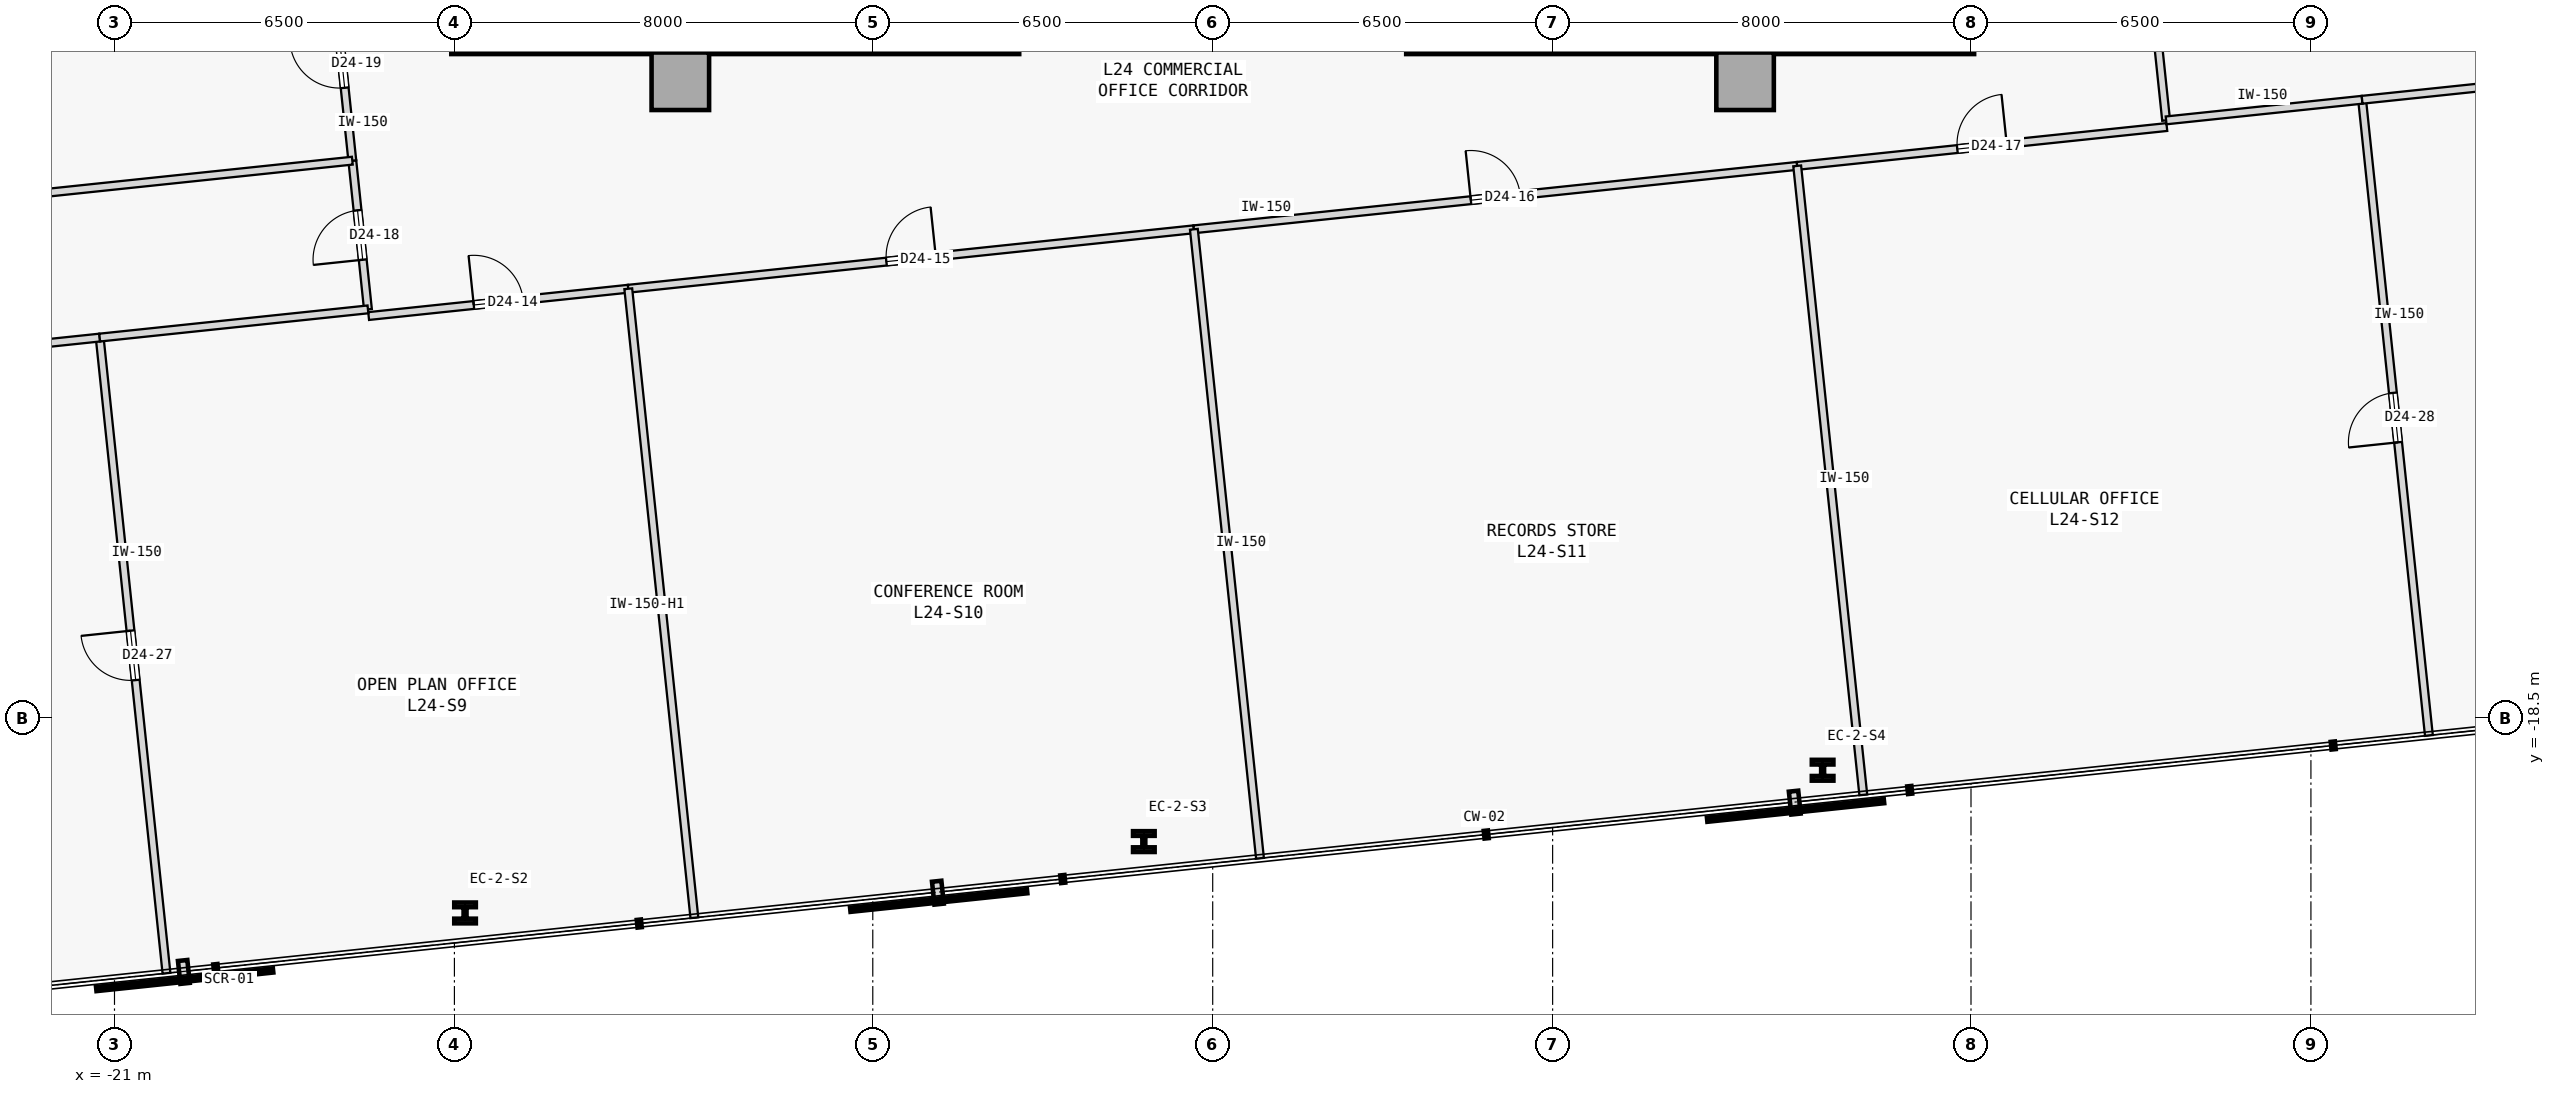
"""IFC4 building model, lengths in metres.
Left out: names, types, materials, properties, quantities, classifications, styles, units other than length and angle.
Written with IfcOpenShell. Run it as: python <this file> out.ifc"""

import sys

from ifc_helpers import new_model, si_unit, direction, frame, frame_2d, origin, origin_2d, place, context, subcontext, project, spatial, rectangle, i_section, extrude, element, fill, save


model = new_model("IFC4")
c1 = context("Model", 3, precision=1e-05, world=origin(), true_north=direction((0.0, 1.0)))
c2 = subcontext(c1, "Body", "Model", "MODEL_VIEW")
j1 = project(units=[si_unit("LENGTHUNIT", "METRE"), si_unit("PLANEANGLEUNIT", "RADIAN")], contexts=[c1])
p1 = place(None, origin())
s1 = spatial("IfcSite", under=j1, at=p1, CompositionType="ELEMENT")
p2 = place(p1, origin())
s2 = spatial("IfcBuilding", under=s1, at=p2, CompositionType="ELEMENT")
p3 = place(p2, frame((0.0, 0.0, 98.5)))
s3 = spatial("IfcBuildingStorey", under=s2, at=p3, CompositionType="ELEMENT", Elevation=98.5)
for number, where, z_axis, x_axis in (
    (1, (-10.18, -6.32, 0.0), (0.0, 0.0, 1.0), (1.0, 0.0, 0.0)),
    (2, (10.18, -6.32, 0.0), (0.0, 0.0, 1.0), (1.0, 0.0, 0.0)),
):
    element("IfcColumn", number, at=place(p3, frame(where, z_axis=z_axis, x_axis=x_axis)), inside=s3, PredefinedType="COLUMN", context=c2, shape_type="SweptSolid", body=[
        extrude(rectangle(XDim=1.1, YDim=1.1, at=origin_2d()), origin(), (0.0, 0.0, 1.0), 3.7),
    ])
for number, where, z_axis, x_axis in (
    (3, (-14.56, -5.6, 0.0), (0.0, 0.0, 1.0), (1.0, 0.0, 0.0)),
    (4, (3.7, -5.6, 0.0), (0.0, 0.0, 1.0), (1.0, 0.0, 0.0)),
):
    element("IfcWall", number, at=place(p3, frame(where, z_axis=z_axis, x_axis=x_axis)), inside=s3, PredefinedType="SHEAR", context=c2, shape_type="SweptSolid", body=[
        extrude(rectangle(XDim=10.86, YDim=0.4, at=frame_2d((5.43, 0.0))), origin(), (0.0, 0.0, 1.0), 3.475),
    ])
for number, where, z_axis, x_axis in (
    (5, (-14.297, -22.222, 0.0), (0.0, 0.0, 1.0), (1.0, 0.0, 0.0)),
    (6, (-1.317, -20.858, 0.0), (0.0, 0.0, 1.0), (1.0, 0.0, 0.0)),
    (7, (11.663, -19.494, 0.0), (0.0, 0.0, 1.0), (1.0, 0.0, 0.0)),
):
    element("IfcColumn", number, at=place(p3, frame(where, z_axis=z_axis, x_axis=x_axis)), inside=s3, PredefinedType="COLUMN", context=c2, shape_type="SweptSolid", body=[
        extrude(i_section(OverallWidth=0.413, OverallDepth=0.398, WebThickness=0.056, FlangeThickness=0.089, FilletRadius=0.015, at=origin_2d()), origin(), (0.0, 0.0, 1.0), 3.7),
    ])
p4 = place(p3, frame((-16.14, -10.809, 0.0), z_axis=(0.0, 0.0, 1.0), x_axis=(0.994523393184, 0.104514211519, 0.0)))
e8 = element("IfcWall", 8, at=p4, inside=s3, PredefinedType="PARTITIONING", context=c2, shape_type="SweptSolid", body=[
    extrude(rectangle(XDim=4.992, YDim=0.15, at=frame_2d((2.496, 0.0))), origin(), (0.0, 0.0, 1.0), 3.475),
])
p5 = place(p4, frame((2.021, 0.0, 0.0)))
e9 = element("IfcOpeningElement", 9, at=p5, cuts=e8, PredefinedType="OPENING", context=c2, shape_type="SweptSolid", body=[
    extrude(rectangle(XDim=0.95, YDim=2.15, at=frame_2d((0.475, 1.075))), frame((0.0, 0.085, 0.0), z_axis=(0.0, -1.0, 0.0), x_axis=(1.0, 0.0, 0.0)), (0.0, 0.0, 1.0), 0.17),
])
p6 = place(p3, frame((-11.175, -10.287, 0.0), z_axis=(0.0, 0.0, 1.0), x_axis=(0.994522169869, 0.104525851533, 0.0)))
e10 = element("IfcWall", 10, at=p6, inside=s3, PredefinedType="PARTITIONING", context=c2, shape_type="SweptSolid", body=[
    extrude(rectangle(XDim=10.875, YDim=0.15, at=frame_2d((5.438, 0.0))), origin(), (0.0, 0.0, 1.0), 3.475),
])
p7 = place(p6, frame((4.962, 0.0, 0.0)))
e11 = element("IfcOpeningElement", 11, at=p7, cuts=e10, PredefinedType="OPENING", context=c2, shape_type="SweptSolid", body=[
    extrude(rectangle(XDim=0.95, YDim=2.15, at=frame_2d((0.475, 1.075))), frame((0.0, 0.085, 0.0), z_axis=(0.0, -1.0, 0.0), x_axis=(1.0, 0.0, 0.0)), (0.0, 0.0, 1.0), 0.17),
])
p8 = place(p3, frame((-0.36, -9.151, 0.0), z_axis=(0.0, 0.0, 1.0), x_axis=(0.994520780406, 0.10453907088, 0.0)))
e12 = element("IfcWall", 12, at=p8, inside=s3, PredefinedType="PARTITIONING", context=c2, shape_type="SweptSolid", body=[
    extrude(rectangle(XDim=11.6, YDim=0.15, at=frame_2d((5.8, 0.0))), origin(), (0.0, 0.0, 1.0), 3.475),
])
p9 = place(p8, frame((5.325, 0.0, 0.0)))
e13 = element("IfcOpeningElement", 13, at=p9, cuts=e12, PredefinedType="OPENING", context=c2, shape_type="SweptSolid", body=[
    extrude(rectangle(XDim=0.95, YDim=2.15, at=frame_2d((0.475, 1.075))), frame((0.0, 0.085, 0.0), z_axis=(0.0, -1.0, 0.0), x_axis=(1.0, 0.0, 0.0)), (0.0, 0.0, 1.0), 0.17),
])
p10 = place(p3, frame((11.177, -7.938, 0.0), z_axis=(0.0, 0.0, 1.0), x_axis=(0.994525011473, 0.104498811264, 0.0)))
e14 = element("IfcWall", 14, at=p10, inside=s3, PredefinedType="PARTITIONING", context=c2, shape_type="SweptSolid", body=[
    extrude(rectangle(XDim=7.107, YDim=0.15, at=frame_2d((3.553, 0.0))), origin(), (0.0, 0.0, 1.0), 3.475),
])
p11 = place(p10, frame((3.079, 0.0, 0.0)))
e15 = element("IfcOpeningElement", 15, at=p11, cuts=e14, PredefinedType="OPENING", context=c2, shape_type="SweptSolid", body=[
    extrude(rectangle(XDim=0.95, YDim=2.15, at=frame_2d((0.475, 1.075))), frame((0.0, 0.085, 0.0), z_axis=(0.0, -1.0, 0.0), x_axis=(1.0, 0.0, 0.0)), (0.0, 0.0, 1.0), 0.17),
])
p12 = place(p3, frame((-16.153, -10.682, 0.0), z_axis=(0.0, 0.0, 1.0), x_axis=(-0.104600331874, 0.994514339048, 0.0)))
e16 = element("IfcWall", 16, at=p12, inside=s3, PredefinedType="PARTITIONING", context=c2, shape_type="SweptSolid", body=[
    extrude(rectangle(XDim=2.859, YDim=0.15, at=frame_2d((1.43, 0.0))), origin(), (0.0, 0.0, 1.0), 3.475),
])
p13 = place(p12, frame((0.955, 0.0, 0.0)))
e17 = element("IfcOpeningElement", 17, at=p13, cuts=e16, PredefinedType="OPENING", context=c2, shape_type="SweptSolid", body=[
    extrude(rectangle(XDim=0.95, YDim=2.15, at=frame_2d((0.475, 1.075))), frame((0.0, 0.085, 0.0), z_axis=(0.0, -1.0, 0.0), x_axis=(1.0, 0.0, 0.0)), (0.0, 0.0, 1.0), 0.17),
])
p14 = place(p3, frame((-16.452, -7.838, 0.0), z_axis=(0.0, 0.0, 1.0), x_axis=(-0.104481590513, 0.994526820777, 0.0)))
e18 = element("IfcWall", 18, at=p14, inside=s3, PredefinedType="PARTITIONING", context=c2, shape_type="SweptSolid", body=[
    extrude(rectangle(XDim=3.753, YDim=0.15, at=frame_2d((1.876, 0.0))), origin(), (0.0, 0.0, 1.0), 3.475),
])
p15 = place(p14, frame((1.402, 0.0, 0.0)))
e19 = element("IfcOpeningElement", 19, at=p15, cuts=e18, PredefinedType="OPENING", context=c2, shape_type="SweptSolid", body=[
    extrude(rectangle(XDim=0.95, YDim=2.15, at=frame_2d((0.475, 1.075))), frame((0.0, 0.085, 0.0), z_axis=(0.0, -1.0, 0.0), x_axis=(1.0, 0.0, 0.0)), (0.0, 0.0, 1.0), 0.17),
])
p16 = place(p3, frame((18.231, -7.068, 0.0), z_axis=(0.0, 0.0, 1.0), x_axis=(-0.104527419485, 0.994522005074, 0.0)))
e20 = element("IfcWall", 20, at=p16, inside=s3, PredefinedType="PARTITIONING", context=c2, shape_type="SweptSolid", body=[
    extrude(rectangle(XDim=8.399, YDim=0.15, at=frame_2d((4.199, 0.0))), origin(), (0.0, 0.0, 1.0), 3.475),
])
p17 = place(p16, frame((3.725, 0.0, 0.0)))
e21 = element("IfcOpeningElement", 21, at=p17, cuts=e20, PredefinedType="OPENING", context=c2, shape_type="SweptSolid", body=[
    extrude(rectangle(XDim=0.95, YDim=2.15, at=frame_2d((0.475, 1.075))), frame((0.0, 0.085, 0.0), z_axis=(0.0, -1.0, 0.0), x_axis=(1.0, 0.0, 0.0)), (0.0, 0.0, 1.0), 0.17),
])
p18 = place(p3, frame((-20.006, -23.375, 0.0), z_axis=(0.0, 0.0, 1.0), x_axis=(-0.104540236679, 0.994520657862, 0.0)))
e22 = element("IfcWall", 22, at=p18, inside=s3, PredefinedType="PARTITIONING", context=c2, shape_type="SweptSolid", body=[
    extrude(rectangle(XDim=12.221, YDim=0.15, at=frame_2d((6.11, 0.0))), origin(), (0.0, 0.0, 1.0), 3.475),
])
p19 = place(p18, frame((5.635, 0.0, 0.0)))
e23 = element("IfcOpeningElement", 23, at=p19, cuts=e22, PredefinedType="OPENING", context=c2, shape_type="SweptSolid", body=[
    extrude(rectangle(XDim=0.95, YDim=2.15, at=frame_2d((0.475, 1.075))), frame((0.0, 0.085, 0.0), z_axis=(0.0, -1.0, 0.0), x_axis=(1.0, 0.0, 0.0)), (0.0, 0.0, 1.0), 0.17),
])
p20 = place(p3, frame((-32.099, -12.358, 0.0), z_axis=(0.0, 0.0, 1.0), x_axis=(0.994522169869, 0.104525851533, 0.0)))
e24 = element("IfcWall", 24, at=p20, inside=s3, PredefinedType="PARTITIONING", context=c2, shape_type="SweptSolid", body=[
    extrude(rectangle(XDim=10.875, YDim=0.15, at=frame_2d((5.438, 0.0))), origin(), (0.0, 0.0, 1.0), 3.475),
])
p21 = place(p3, frame((-9.911, -22.314, 0.0), z_axis=(0.0, 0.0, 1.0), x_axis=(-0.104515587229, 0.99452324861, 0.0)))
e25 = element("IfcWall", 25, at=p21, inside=s3, PredefinedType="PARTITIONING", context=c2, shape_type="SweptSolid", body=[
    extrude(rectangle(XDim=12.093, YDim=0.15, at=frame_2d((6.046, 0.0))), origin(), (0.0, 0.0, 1.0), 3.025),
])
p22 = place(p3, frame((-21.283, -11.221, 0.0), z_axis=(0.0, 0.0, 1.0), x_axis=(0.994524110249, 0.104507387942, 0.0)))
e26 = element("IfcWall", 26, at=p22, inside=s3, PredefinedType="PARTITIONING", context=c2, shape_type="SweptSolid", body=[
    extrude(rectangle(XDim=5.158, YDim=0.15, at=frame_2d((2.579, 0.0))), origin(), (0.0, 0.0, 1.0), 3.475),
])
p23 = place(p3, frame((0.904, -21.177, 0.0), z_axis=(0.0, 0.0, 1.0), x_axis=(-0.104517685722, 0.994523028075, 0.0)))
e27 = element("IfcWall", 27, at=p23, inside=s3, PredefinedType="PARTITIONING", context=c2, shape_type="SweptSolid", body=[
    extrude(rectangle(XDim=12.093, YDim=0.15, at=frame_2d((6.046, 0.0))), origin(), (0.0, 0.0, 1.0), 3.475),
])
p24 = place(p3, frame((12.441, -19.965, 0.0), z_axis=(0.0, 0.0, 1.0), x_axis=(-0.104535555083, 0.994521149963, 0.0)))
e28 = element("IfcWall", 28, at=p24, inside=s3, PredefinedType="PARTITIONING", context=c2, shape_type="SweptSolid", body=[
    extrude(rectangle(XDim=12.093, YDim=0.15, at=frame_2d((6.046, 0.0))), origin(), (0.0, 0.0, 1.0), 3.475),
])
p25 = place(p3, frame((23.256, -18.828, 0.0), z_axis=(0.0, 0.0, 1.0), x_axis=(-0.104540236679, 0.994520657862, 0.0)))
e29 = element("IfcWall", 29, at=p25, inside=s3, PredefinedType="PARTITIONING", context=c2, shape_type="SweptSolid", body=[
    extrude(rectangle(XDim=12.221, YDim=0.15, at=frame_2d((6.11, 0.0))), origin(), (0.0, 0.0, 1.0), 3.475),
])
p26 = place(p25, frame((5.635, 0.0, 0.0)))
e30 = element("IfcOpeningElement", 30, at=p26, cuts=e29, PredefinedType="OPENING", context=c2, shape_type="SweptSolid", body=[
    extrude(rectangle(XDim=0.95, YDim=2.15, at=frame_2d((0.475, 1.075))), frame((0.0, 0.085, 0.0), z_axis=(0.0, -1.0, 0.0), x_axis=(1.0, 0.0, 0.0)), (0.0, 0.0, 1.0), 0.17),
])
p27 = place(p3, frame((18.231, -7.068, 0.0), z_axis=(0.0, 0.0, 1.0), x_axis=(0.99452354487, 0.10451276812, 0.0)))
e31 = element("IfcWall", 31, at=p27, inside=s3, PredefinedType="PARTITIONING", context=c2, shape_type="SweptSolid", body=[
    extrude(rectangle(XDim=3.768, YDim=0.15, at=frame_2d((1.884, 0.0))), origin(), (0.0, 0.0, 1.0), 3.475),
])
p28 = place(p3, frame((21.979, -6.674, 0.0), z_axis=(0.0, 0.0, 1.0), x_axis=(0.994519921083, 0.10454724563, 0.0)))
e32 = element("IfcWall", 32, at=p28, inside=s3, PredefinedType="PARTITIONING", context=c2, shape_type="SweptSolid", body=[
    extrude(rectangle(XDim=9.425, YDim=0.15, at=frame_2d((4.712, 0.0))), origin(), (0.0, 0.0, 1.0), 3.475),
])
p29 = place(p3, frame((-32.397, -9.514, 0.0), z_axis=(0.0, 0.0, 1.0), x_axis=(0.994521044813, 0.104536555445, 0.0)))
e33 = element("IfcWall", 33, at=p29, inside=s3, PredefinedType="PARTITIONING", context=c2, shape_type="SweptSolid", body=[
    extrude(rectangle(XDim=16.033, YDim=0.15, at=frame_2d((8.017, 0.0))), origin(), (0.0, 0.0, 1.0), 3.475),
])
p30 = place(p3, frame((-32.79, -5.782, 0.0), z_axis=(0.0, 0.0, 1.0), x_axis=(0.994522794159, 0.104519911488, 0.0)))
e34 = element("IfcWall", 34, at=p30, inside=s3, PredefinedType="PARTITIONING", context=c2, shape_type="SweptSolid", body=[
    extrude(rectangle(XDim=16.033, YDim=0.15, at=frame_2d((8.017, 0.0))), origin(), (0.0, 0.0, 1.0), 3.025),
])
p31 = place(p5, origin())
e35 = element("IfcDoor", 35, at=p31, inside=s3, OperationType="SINGLE_SWING_LEFT", PredefinedType="DOOR", context=c2, shape_type="SweptSolid", body=[
    extrude(rectangle(XDim=0.95, YDim=2.15, at=frame_2d((0.475, 1.075))), frame((0.0, 0.025, 0.0), z_axis=(0.0, -1.0, 0.0), x_axis=(1.0, 0.0, 0.0)), (0.0, 0.0, 1.0), 0.05),
])
fill(e9, e35)
p32 = place(p7, origin())
e36 = element("IfcDoor", 36, at=p32, inside=s3, OperationType="SINGLE_SWING_RIGHT", PredefinedType="DOOR", context=c2, shape_type="SweptSolid", body=[
    extrude(rectangle(XDim=0.95, YDim=2.15, at=frame_2d((0.475, 1.075))), frame((0.0, 0.025, 0.0), z_axis=(0.0, -1.0, 0.0), x_axis=(1.0, 0.0, 0.0)), (0.0, 0.0, 1.0), 0.05),
])
fill(e11, e36)
p33 = place(p9, origin())
e37 = element("IfcDoor", 37, at=p33, inside=s3, OperationType="SINGLE_SWING_LEFT", PredefinedType="DOOR", context=c2, shape_type="SweptSolid", body=[
    extrude(rectangle(XDim=0.95, YDim=2.15, at=frame_2d((0.475, 1.075))), frame((0.0, 0.025, 0.0), z_axis=(0.0, -1.0, 0.0), x_axis=(1.0, 0.0, 0.0)), (0.0, 0.0, 1.0), 0.05),
])
fill(e13, e37)
p34 = place(p11, origin())
e38 = element("IfcDoor", 38, at=p34, inside=s3, OperationType="SINGLE_SWING_RIGHT", PredefinedType="DOOR", context=c2, shape_type="SweptSolid", body=[
    extrude(rectangle(XDim=0.95, YDim=2.15, at=frame_2d((0.475, 1.075))), frame((0.0, 0.025, 0.0), z_axis=(0.0, -1.0, 0.0), x_axis=(1.0, 0.0, 0.0)), (0.0, 0.0, 1.0), 0.05),
])
fill(e15, e38)
p35 = place(p13, origin())
e39 = element("IfcDoor", 39, at=p35, inside=s3, OperationType="SINGLE_SWING_LEFT", PredefinedType="DOOR", context=c2, shape_type="SweptSolid", body=[
    extrude(rectangle(XDim=0.95, YDim=2.15, at=frame_2d((0.475, 1.075))), frame((0.0, 0.025, 0.0), z_axis=(0.0, -1.0, 0.0), x_axis=(1.0, 0.0, 0.0)), (0.0, 0.0, 1.0), 0.05),
])
fill(e17, e39)
p36 = place(p15, origin())
e40 = element("IfcDoor", 40, at=p36, inside=s3, OperationType="SINGLE_SWING_RIGHT", PredefinedType="DOOR", context=c2, shape_type="SweptSolid", body=[
    extrude(rectangle(XDim=0.95, YDim=2.15, at=frame_2d((0.475, 1.075))), frame((0.0, 0.025, 0.0), z_axis=(0.0, -1.0, 0.0), x_axis=(1.0, 0.0, 0.0)), (0.0, 0.0, 1.0), 0.05),
])
fill(e19, e40)
p37 = place(p19, origin())
e41 = element("IfcDoor", 41, at=p37, inside=s3, OperationType="SINGLE_SWING_RIGHT", PredefinedType="DOOR", context=c2, shape_type="SweptSolid", body=[
    extrude(rectangle(XDim=0.95, YDim=2.15, at=frame_2d((0.475, 1.075))), frame((0.0, 0.025, 0.0), z_axis=(0.0, -1.0, 0.0), x_axis=(1.0, 0.0, 0.0)), (0.0, 0.0, 1.0), 0.05),
])
fill(e23, e41)
p38 = place(p26, origin())
e42 = element("IfcDoor", 42, at=p38, inside=s3, OperationType="SINGLE_SWING_LEFT", PredefinedType="DOOR", context=c2, shape_type="SweptSolid", body=[
    extrude(rectangle(XDim=0.95, YDim=2.15, at=frame_2d((0.475, 1.075))), frame((0.0, 0.025, 0.0), z_axis=(0.0, -1.0, 0.0), x_axis=(1.0, 0.0, 0.0)), (0.0, 0.0, 1.0), 0.05),
])
fill(e30, e42)
save(model, sys.argv[1])
